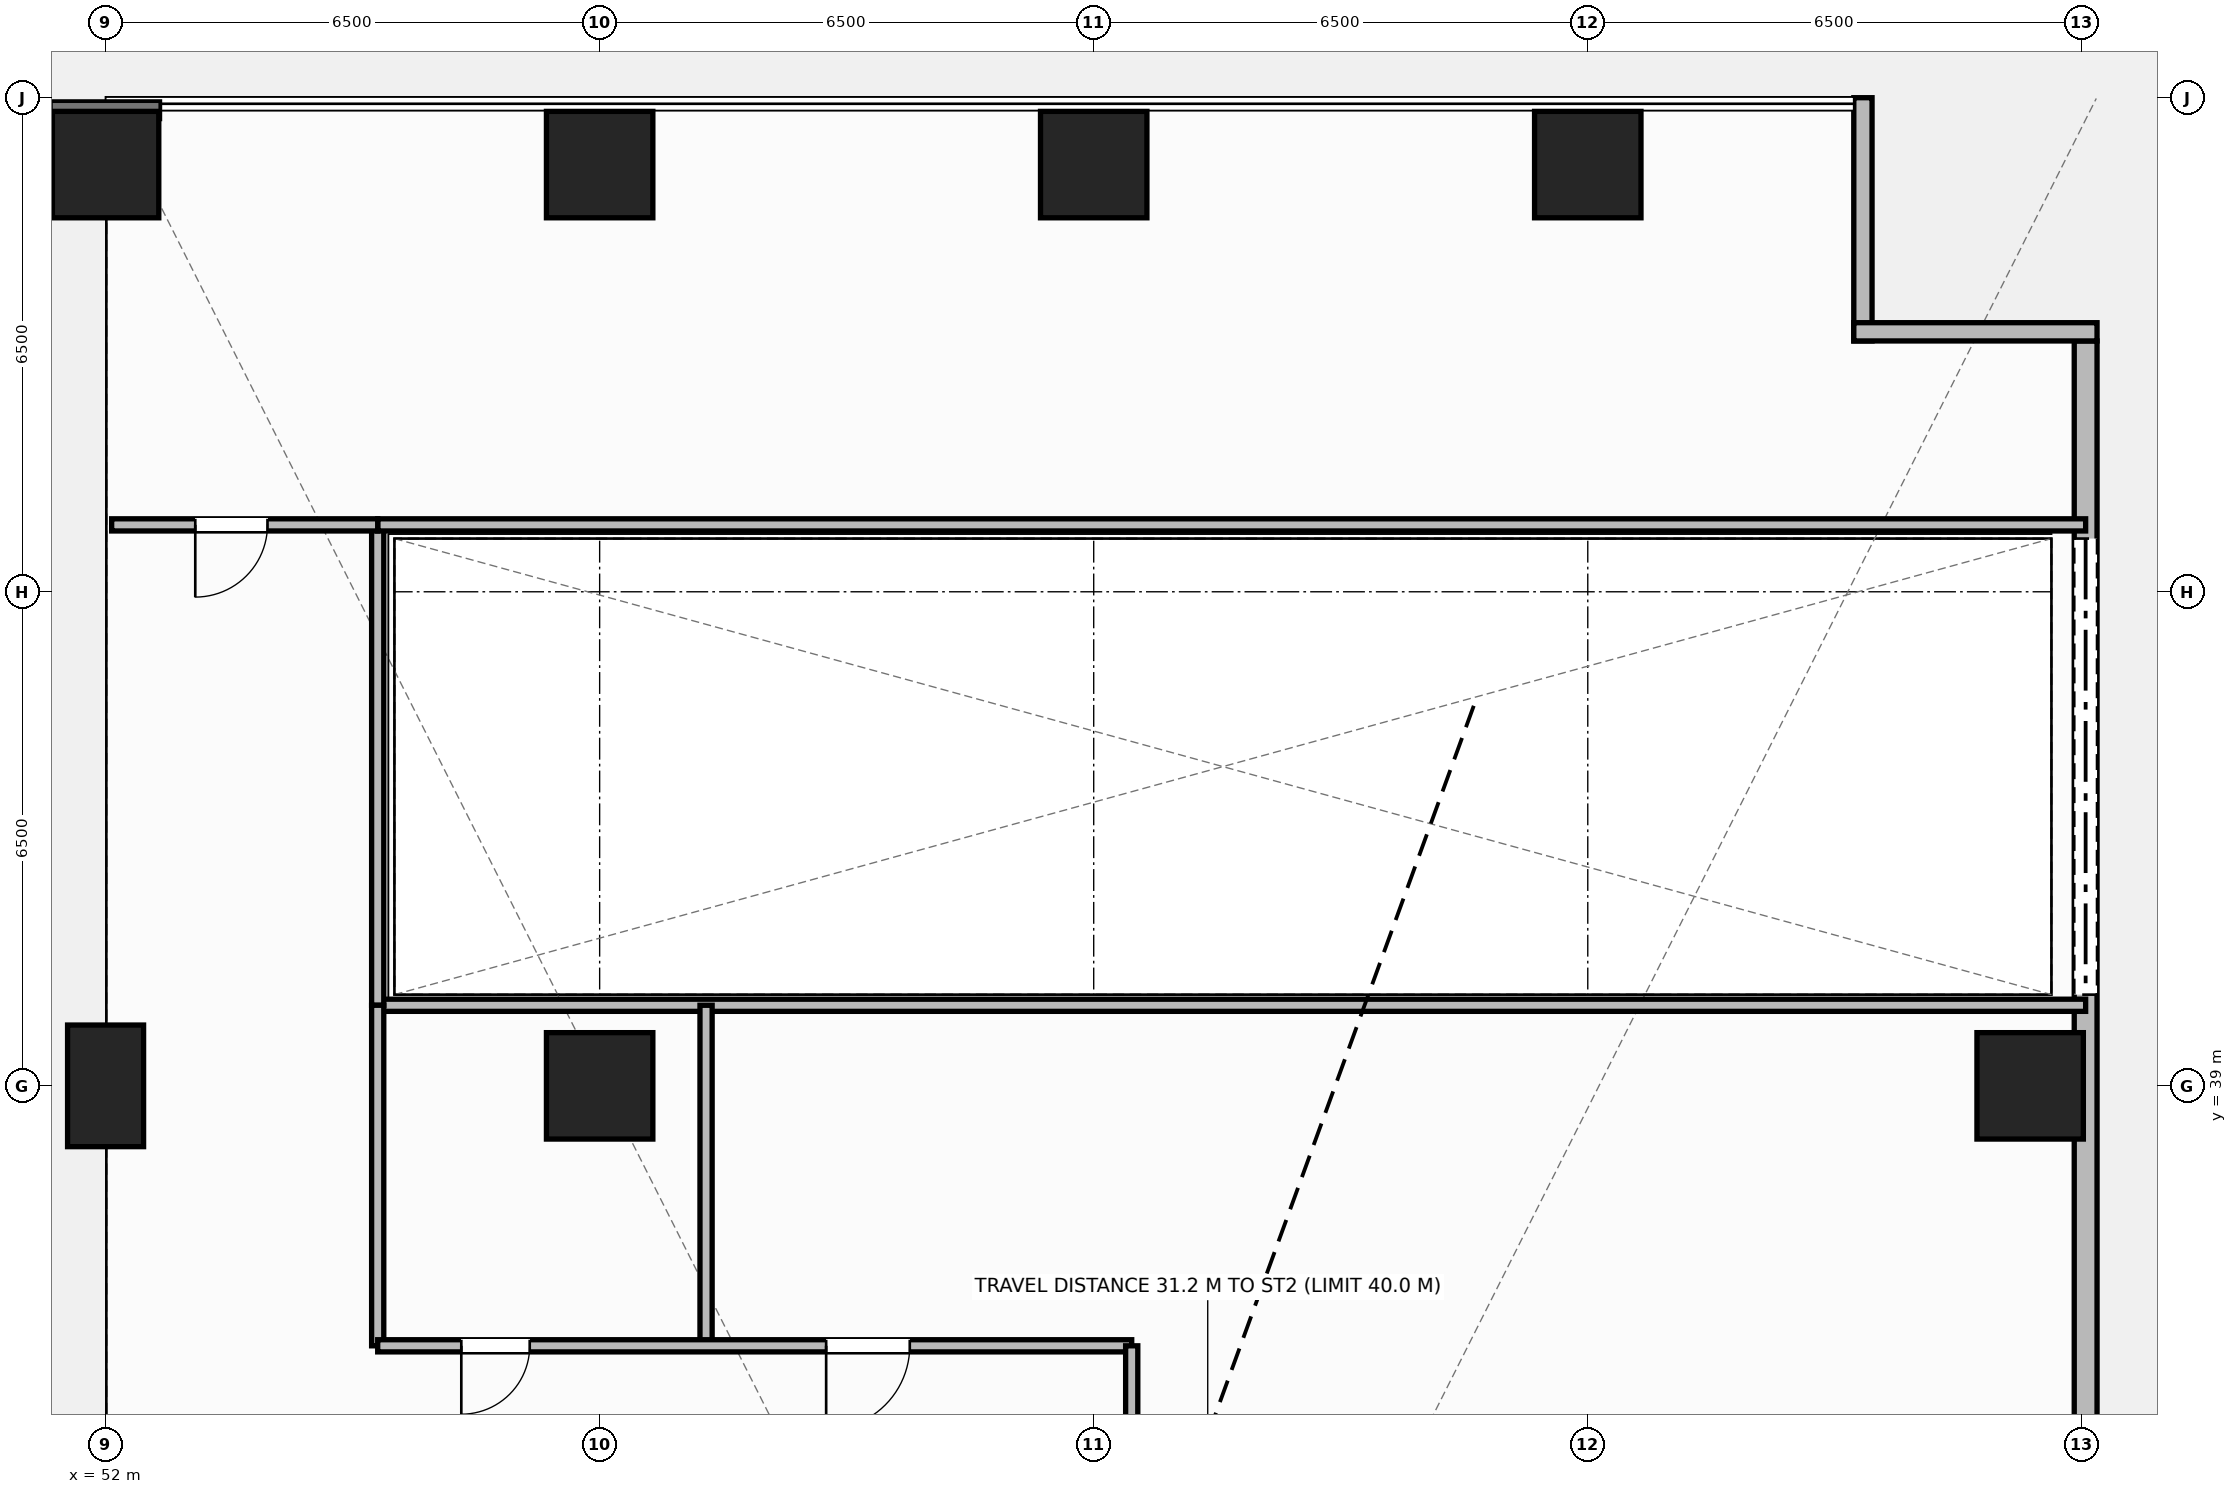
"""IFC4 building model, lengths in metres.
Left out: names, types, materials, properties, quantities, classifications, styles, units other than length and angle.
Written with IfcOpenShell. Run it as: python <this file> out.ifc"""

import sys

from ifc_helpers import new_model, si_unit, direction, frame, frame_2d, origin, origin_2d, place, context, subcontext, project, spatial, rectangle, extrude, element, fill, save


model = new_model("IFC4")
c1 = context("Model", 3, precision=1e-05, world=origin(), true_north=direction((0.0, 1.0)))
c2 = subcontext(c1, "Body", "Model", "MODEL_VIEW")
j1 = project(units=[si_unit("LENGTHUNIT", "METRE"), si_unit("PLANEANGLEUNIT", "RADIAN")], contexts=[c1])
p1 = place(None, origin())
s1 = spatial("IfcSite", under=j1, at=p1, CompositionType="ELEMENT")
p2 = place(p1, origin())
s2 = spatial("IfcBuilding", under=s1, at=p2, CompositionType="ELEMENT")
p3 = place(p2, origin())
s3 = spatial("IfcBuildingStorey", under=s2, at=p3, CompositionType="ELEMENT", Elevation=0.0)
p4 = place(p3, frame((58.5, 39.0, 0.0), z_axis=(0.0, 0.0, 1.0), x_axis=(1.0, 0.0, 0.0)))
e1 = element("IfcColumn", 1, at=p4, inside=s3, PredefinedType="COLUMN", context=c2, shape_type="SweptSolid", body=[
    extrude(rectangle(XDim=1.4, YDim=1.4, at=origin_2d()), origin(), (0.0, 0.0, 1.0), 6.0),
])
p5 = place(p3, frame((52.0, 39.0, 0.0), z_axis=(0.0, 0.0, 1.0), x_axis=(1.0, 0.0, 0.0)))
e2 = element("IfcColumn", 2, at=p5, inside=s3, PredefinedType="PILASTER", context=c2, shape_type="SweptSolid", body=[
    extrude(rectangle(XDim=1.0, YDim=1.6, at=origin_2d()), origin(), (0.0, 0.0, 1.0), 6.0),
])
for number, where, z_axis, x_axis in (
    (3, (52.0, 51.12, 0.0), (0.0, 0.0, 1.0), (1.0, 0.0, 0.0)),
    (4, (58.5, 51.12, 0.0), (0.0, 0.0, 1.0), (1.0, 0.0, 0.0)),
    (5, (65.0, 51.12, 0.0), (0.0, 0.0, 1.0), (1.0, 0.0, 0.0)),
    (6, (71.5, 51.12, 0.0), (0.0, 0.0, 1.0), (1.0, 0.0, 0.0)),
    (7, (77.32, 39.0, 0.0), (0.0, 0.0, 1.0), (1.0, 0.0, 0.0)),
):
    element("IfcColumn", number, at=place(p3, frame(where, z_axis=z_axis, x_axis=x_axis)), inside=s3, PredefinedType="COLUMN", context=c2, shape_type="SweptSolid", body=[
        extrude(rectangle(XDim=1.4, YDim=1.4, at=origin_2d()), origin(), (0.0, 0.0, 1.0), 6.0),
    ])
p6 = place(p3, frame((78.05, 48.8, 0.0), z_axis=(0.0, 0.0, 1.0), x_axis=(0.0, -1.0, 0.0)))
e8 = element("IfcWall", 8, at=p6, inside=s3, PredefinedType="STANDARD", context=c2, shape_type="SweptSolid", body=[
    extrude(rectangle(XDim=45.6, YDim=0.3, at=frame_2d((22.8, 0.0))), origin(), (0.0, 0.0, 1.0), 5.72),
])
p7 = place(p6, frame((2.6, 0.0, 0.0)))
e9 = element("IfcOpeningElement", 9, at=p7, cuts=e8, PredefinedType="OPENING", context=c2, shape_type="SweptSolid", body=[
    extrude(rectangle(XDim=6.0, YDim=3.2, at=frame_2d((3.0, 1.6))), frame((0.0, 0.16, 0.0), z_axis=(0.0, -1.0, 0.0), x_axis=(1.0, 0.0, 0.0)), (0.0, 0.0, 1.0), 0.32),
])
p8 = place(p6, frame((25.6, 0.0, 0.0)))
e10 = element("IfcOpeningElement", 10, at=p8, cuts=e8, PredefinedType="OPENING", context=c2, shape_type="SweptSolid", body=[
    extrude(rectangle(XDim=2.2, YDim=2.4, at=frame_2d((1.1, 1.2))), frame((0.0, 0.16, 0.0), z_axis=(0.0, -1.0, 0.0), x_axis=(1.0, 0.0, 0.0)), (0.0, 0.0, 1.0), 0.32),
])
for number, where, z_axis, x_axis in (
    (11, (75.12, 52.0, 0.0), (0.0, 0.0, 1.0), (0.0, -1.0, 0.0)),
    (12, (75.0, 48.92, 0.0), (0.0, 0.0, 1.0), (1.0, 0.0, 0.0)),
):
    element("IfcWall", number, at=place(p3, frame(where, z_axis=z_axis, x_axis=x_axis)), inside=s3, PredefinedType="STANDARD", context=c2, shape_type="SweptSolid", body=[
        extrude(rectangle(XDim=3.2, YDim=0.24, at=frame_2d((1.6, 0.0))), origin(), (0.0, 0.0, 1.0), 5.72),
    ])
p9 = place(p3, frame((55.58, 40.06, 0.0), z_axis=(0.0, 0.0, 1.0), x_axis=(1.0, 0.0, 0.0)))
e13 = element("IfcWall", 13, at=p9, inside=s3, PredefinedType="STANDARD", context=c2, shape_type="SweptSolid", body=[
    extrude(rectangle(XDim=22.47, YDim=0.16, at=frame_2d((11.235, 0.0))), origin(), (0.0, 0.0, 1.0), 5.72),
])
p10 = place(p3, frame((55.58, 40.06, 0.0), z_axis=(0.0, 0.0, 1.0), x_axis=(0.0, 1.0, 0.0)))
e14 = element("IfcWall", 14, at=p10, inside=s3, PredefinedType="STANDARD", context=c2, shape_type="SweptSolid", body=[
    extrude(rectangle(XDim=6.32, YDim=0.16, at=frame_2d((3.16, 0.0))), origin(), (0.0, 0.0, 1.0), 5.72),
])
p11 = place(p3, frame((55.58, 46.38, 0.0), z_axis=(0.0, 0.0, 1.0), x_axis=(1.0, 0.0, 0.0)))
e15 = element("IfcWall", 15, at=p11, inside=s3, PredefinedType="STANDARD", context=c2, shape_type="SweptSolid", body=[
    extrude(rectangle(XDim=22.47, YDim=0.16, at=frame_2d((11.235, 0.0))), origin(), (0.0, 0.0, 1.0), 5.72),
])
for number, where, z_axis, x_axis in (
    (16, (55.58, 35.58, 0.0), (0.0, 0.0, 1.0), (0.0, 1.0, 0.0)),
    (17, (59.9, 35.58, 0.0), (0.0, 0.0, 1.0), (0.0, 1.0, 0.0)),
):
    element("IfcWall", number, at=place(p3, frame(where, z_axis=z_axis, x_axis=x_axis)), inside=s3, PredefinedType="STANDARD", context=c2, shape_type="SweptSolid", body=[
        extrude(rectangle(XDim=4.48, YDim=0.16, at=frame_2d((2.24, 0.0))), origin(), (0.0, 0.0, 1.0), 5.72),
    ])
p12 = place(p3, frame((55.58, 35.58, 0.0), z_axis=(0.0, 0.0, 1.0), x_axis=(1.0, 0.0, 0.0)))
e18 = element("IfcWall", 18, at=p12, inside=s3, PredefinedType="STANDARD", context=c2, shape_type="SweptSolid", body=[
    extrude(rectangle(XDim=9.92, YDim=0.16, at=frame_2d((4.96, 0.0))), origin(), (0.0, 0.0, 1.0), 5.72),
])
p13 = place(p12, frame((1.1, 0.0, 0.0)))
e19 = element("IfcOpeningElement", 19, at=p13, cuts=e18, PredefinedType="OPENING", context=c2, shape_type="SweptSolid", body=[
    extrude(rectangle(XDim=0.9, YDim=2.15, at=frame_2d((0.45, 1.075))), frame((0.0, 0.09, 0.0), z_axis=(0.0, -1.0, 0.0), x_axis=(1.0, 0.0, 0.0)), (0.0, 0.0, 1.0), 0.18),
])
p14 = place(p12, frame((5.9, 0.0, 0.0)))
e20 = element("IfcOpeningElement", 20, at=p14, cuts=e18, PredefinedType="OPENING", context=c2, shape_type="SweptSolid", body=[
    extrude(rectangle(XDim=1.1, YDim=2.15, at=frame_2d((0.55, 1.075))), frame((0.0, 0.09, 0.0), z_axis=(0.0, -1.0, 0.0), x_axis=(1.0, 0.0, 0.0)), (0.0, 0.0, 1.0), 0.18),
])
p15 = place(p3, frame((65.5, 33.4, 0.0), z_axis=(0.0, 0.0, 1.0), x_axis=(0.0, 1.0, 0.0)))
e21 = element("IfcWall", 21, at=p15, inside=s3, PredefinedType="STANDARD", context=c2, shape_type="SweptSolid", body=[
    extrude(rectangle(XDim=2.18, YDim=0.16, at=frame_2d((1.09, 0.0))), origin(), (0.0, 0.0, 1.0), 5.72),
])
p16 = place(p3, frame((52.08, 46.38, 0.0), z_axis=(0.0, 0.0, 1.0), x_axis=(1.0, 0.0, 0.0)))
e22 = element("IfcWall", 22, at=p16, inside=s3, PredefinedType="STANDARD", context=c2, shape_type="SweptSolid", body=[
    extrude(rectangle(XDim=3.5, YDim=0.16, at=frame_2d((1.75, 0.0))), origin(), (0.0, 0.0, 1.0), 5.72),
])
p17 = place(p16, frame((1.1, 0.0, 0.0)))
e23 = element("IfcOpeningElement", 23, at=p17, cuts=e22, PredefinedType="OPENING", context=c2, shape_type="SweptSolid", body=[
    extrude(rectangle(XDim=0.95, YDim=2.15, at=frame_2d((0.475, 1.075))), frame((0.0, 0.09, 0.0), z_axis=(0.0, -1.0, 0.0), x_axis=(1.0, 0.0, 0.0)), (0.0, 0.0, 1.0), 0.18),
])
p18 = place(p7, origin())
e24 = element("IfcDoor", 24, at=p18, inside=s3, OperationType="ROLLINGUP", PredefinedType="GATE", context=c2, shape_type="SweptSolid", body=[
    extrude(rectangle(XDim=6.0, YDim=3.2, at=frame_2d((3.0, 1.6))), frame((0.0, 0.025, 0.0), z_axis=(0.0, -1.0, 0.0), x_axis=(1.0, 0.0, 0.0)), (0.0, 0.0, 1.0), 0.05),
])
fill(e9, e24)
p19 = place(p13, origin())
e25 = element("IfcDoor", 25, at=p19, inside=s3, OperationType="SINGLE_SWING_RIGHT", PredefinedType="DOOR", context=c2, shape_type="SweptSolid", body=[
    extrude(rectangle(XDim=0.9, YDim=2.15, at=frame_2d((0.45, 1.075))), frame((0.0, 0.025, 0.0), z_axis=(0.0, -1.0, 0.0), x_axis=(1.0, 0.0, 0.0)), (0.0, 0.0, 1.0), 0.05),
])
fill(e19, e25)
p20 = place(p14, origin())
e26 = element("IfcDoor", 26, at=p20, inside=s3, OperationType="SINGLE_SWING_RIGHT", PredefinedType="DOOR", context=c2, shape_type="SweptSolid", body=[
    extrude(rectangle(XDim=1.1, YDim=2.15, at=frame_2d((0.55, 1.075))), frame((0.0, 0.025, 0.0), z_axis=(0.0, -1.0, 0.0), x_axis=(1.0, 0.0, 0.0)), (0.0, 0.0, 1.0), 0.05),
])
fill(e20, e26)
p21 = place(p17, origin())
e27 = element("IfcDoor", 27, at=p21, inside=s3, OperationType="SINGLE_SWING_RIGHT", PredefinedType="DOOR", context=c2, shape_type="SweptSolid", body=[
    extrude(rectangle(XDim=0.95, YDim=2.15, at=frame_2d((0.475, 1.075))), frame((0.0, 0.025, 0.0), z_axis=(0.0, -1.0, 0.0), x_axis=(1.0, 0.0, 0.0)), (0.0, 0.0, 1.0), 0.05),
])
fill(e23, e27)
save(model, sys.argv[1])
